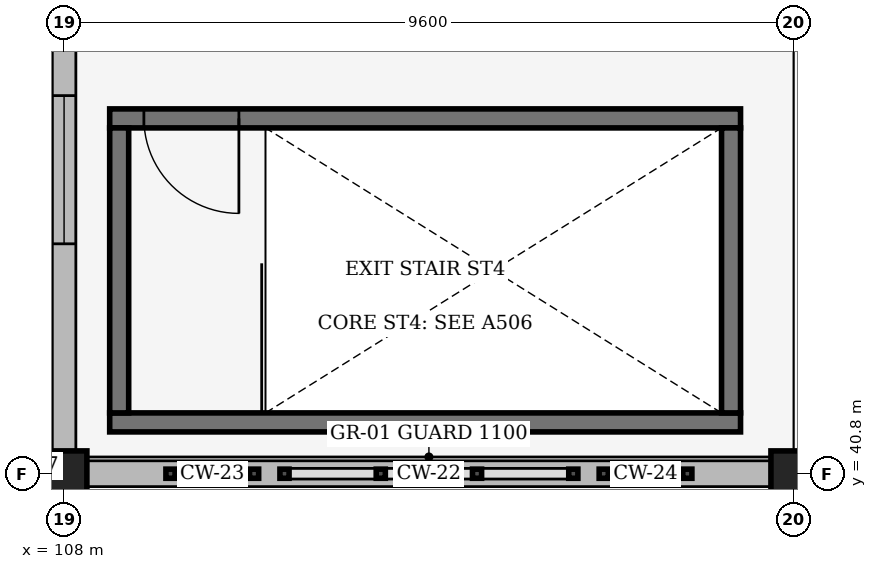
"""IFC4 building model, lengths in metres.
Left out: names, types, materials, properties, quantities, classifications, styles, units other than length and angle.
Written with IfcOpenShell. Run it as: python <this file> out.ifc"""

import sys

from ifc_helpers import new_model, si_unit, direction, frame, frame_2d, origin, origin_2d, place, context, subcontext, project, spatial, rectangle, extrude, element, fill, save


model = new_model("IFC4")
c1 = context("Model", 3, precision=1e-05, world=origin(), true_north=direction((0.0, 1.0)))
c2 = subcontext(c1, "Body", "Model", "MODEL_VIEW")
j1 = project(units=[si_unit("LENGTHUNIT", "METRE"), si_unit("PLANEANGLEUNIT", "RADIAN")], contexts=[c1])
p1 = place(None, origin())
s1 = spatial("IfcSite", under=j1, at=p1, CompositionType="ELEMENT")
p2 = place(p1, origin())
s2 = spatial("IfcBuilding", under=s1, at=p2, CompositionType="ELEMENT")
p3 = place(p2, frame((0.0, 0.0, 15.3)))
s3 = spatial("IfcBuildingStorey", under=s2, at=p3, CompositionType="ELEMENT", Elevation=15.3)
for number, where, z_axis, x_axis in (
    (1, (108.0, 40.8, 0.0), (0.0, 0.0, 1.0), (1.0, 0.0, 0.0)),
    (2, (117.6, 40.8, 0.0), (0.0, 0.0, 1.0), (1.0, 0.0, 0.0)),
):
    element("IfcColumn", number, at=place(p3, frame(where, z_axis=z_axis, x_axis=x_axis)), inside=s3, PredefinedType="COLUMN", context=c2, shape_type="SweptSolid", body=[
        extrude(rectangle(XDim=0.6, YDim=0.6, at=origin_2d()), origin(), (0.0, 0.0, 1.0), 4.5),
    ])
p4 = place(p3, frame((108.0, 48.492, 0.0), z_axis=(0.0, 0.0, 1.0), x_axis=(0.0, -1.0, 0.0)))
e3 = element("IfcWall", 3, at=p4, inside=s3, PredefinedType="SOLIDWALL", context=c2, shape_type="SweptSolid", body=[
    extrude(rectangle(XDim=7.384, YDim=0.31, at=frame_2d((3.692, 0.0))), origin(), (0.0, 0.0, 1.0), 4.16),
])
p5 = place(p4, frame((2.717, 0.0, 0.95)))
e4 = element("IfcOpeningElement", 4, at=p5, cuts=e3, PredefinedType="OPENING", context=c2, shape_type="SweptSolid", body=[
    extrude(rectangle(XDim=1.95, YDim=1.5, at=frame_2d((0.975, 0.75))), frame((0.0, 0.165, 0.0), z_axis=(0.0, -1.0, 0.0), x_axis=(1.0, 0.0, 0.0)), (0.0, 0.0, 1.0), 0.33),
])
p6 = place(p3, frame((108.3, 40.8, 0.0), z_axis=(0.0, 0.0, 1.0), x_axis=(1.0, 0.0, 0.0)))
e5 = element("IfcWall", 5, at=p6, inside=s3, PredefinedType="SOLIDWALL", context=c2, shape_type="SweptSolid", body=[
    extrude(rectangle(XDim=9.0, YDim=0.34, at=frame_2d((4.5, 0.0))), origin(), (0.0, 0.0, 1.0), 1.12),
])
p7 = place(p3, frame((108.6, 41.475, 0.0), z_axis=(0.0, 0.0, 1.0), x_axis=(1.0, 0.0, 0.0)))
e6 = element("IfcWall", 6, at=p7, inside=s3, PredefinedType="SHEAR", context=c2, shape_type="SweptSolid", body=[
    extrude(rectangle(XDim=8.3, YDim=0.25, at=frame_2d((4.15, 0.0))), origin(), (0.0, 0.0, 1.0), 4.5),
])
p8 = place(p3, frame((116.9, 45.475, 0.0), z_axis=(0.0, 0.0, 1.0), x_axis=(-1.0, 0.0, 0.0)))
e7 = element("IfcWall", 7, at=p8, inside=s3, PredefinedType="SHEAR", context=c2, shape_type="SweptSolid", body=[
    extrude(rectangle(XDim=8.3, YDim=0.25, at=frame_2d((4.15, 0.0))), origin(), (0.0, 0.0, 1.0), 4.5),
])
p9 = place(p8, frame((7.85, 0.0, 0.0), z_axis=(0.0, 0.0, 1.0), x_axis=(-1.0, 0.0, 0.0)))
e8 = element("IfcOpeningElement", 8, at=p9, cuts=e7, PredefinedType="OPENING", context=c2, shape_type="SweptSolid", body=[
    extrude(rectangle(XDim=1.25, YDim=2.2, at=frame_2d((0.625, 1.1))), frame((0.0, 0.135, 0.0), z_axis=(0.0, -1.0, 0.0), x_axis=(1.0, 0.0, 0.0)), (0.0, 0.0, 1.0), 0.27),
])
for number, where, z_axis, x_axis in (
    (9, (108.725, 45.35, 0.0), (0.0, 0.0, 1.0), (0.0, -1.0, 0.0)),
    (10, (116.775, 41.6, 0.0), (0.0, 0.0, 1.0), (0.0, 1.0, 0.0)),
):
    element("IfcWall", number, at=place(p3, frame(where, z_axis=z_axis, x_axis=x_axis)), inside=s3, PredefinedType="SHEAR", context=c2, shape_type="SweptSolid", body=[
        extrude(rectangle(XDim=3.75, YDim=0.25, at=frame_2d((1.875, 0.0))), origin(), (0.0, 0.0, 1.0), 4.5),
    ])
p10 = place(p5, origin())
e11 = element("IfcWindow", 11, at=p10, inside=s3, PartitioningType="SINGLE_PANEL", PredefinedType="WINDOW", context=c2, shape_type="SweptSolid", body=[
    extrude(rectangle(XDim=1.95, YDim=1.5, at=frame_2d((0.975, 0.75))), frame((0.0, 0.03, 0.0), z_axis=(0.0, -1.0, 0.0), x_axis=(1.0, 0.0, 0.0)), (0.0, 0.0, 1.0), 0.06),
])
fill(e4, e11)
p11 = place(p9, origin())
e12 = element("IfcDoor", 12, at=p11, inside=s3, OperationType="SINGLE_SWING_RIGHT", PredefinedType="DOOR", context=c2, shape_type="SweptSolid", body=[
    extrude(rectangle(XDim=1.25, YDim=2.2, at=frame_2d((0.625, 1.1))), frame((0.0, 0.025, 0.0), z_axis=(0.0, -1.0, 0.0), x_axis=(1.0, 0.0, 0.0)), (0.0, 0.0, 1.0), 0.05),
])
fill(e8, e12)
save(model, sys.argv[1])
